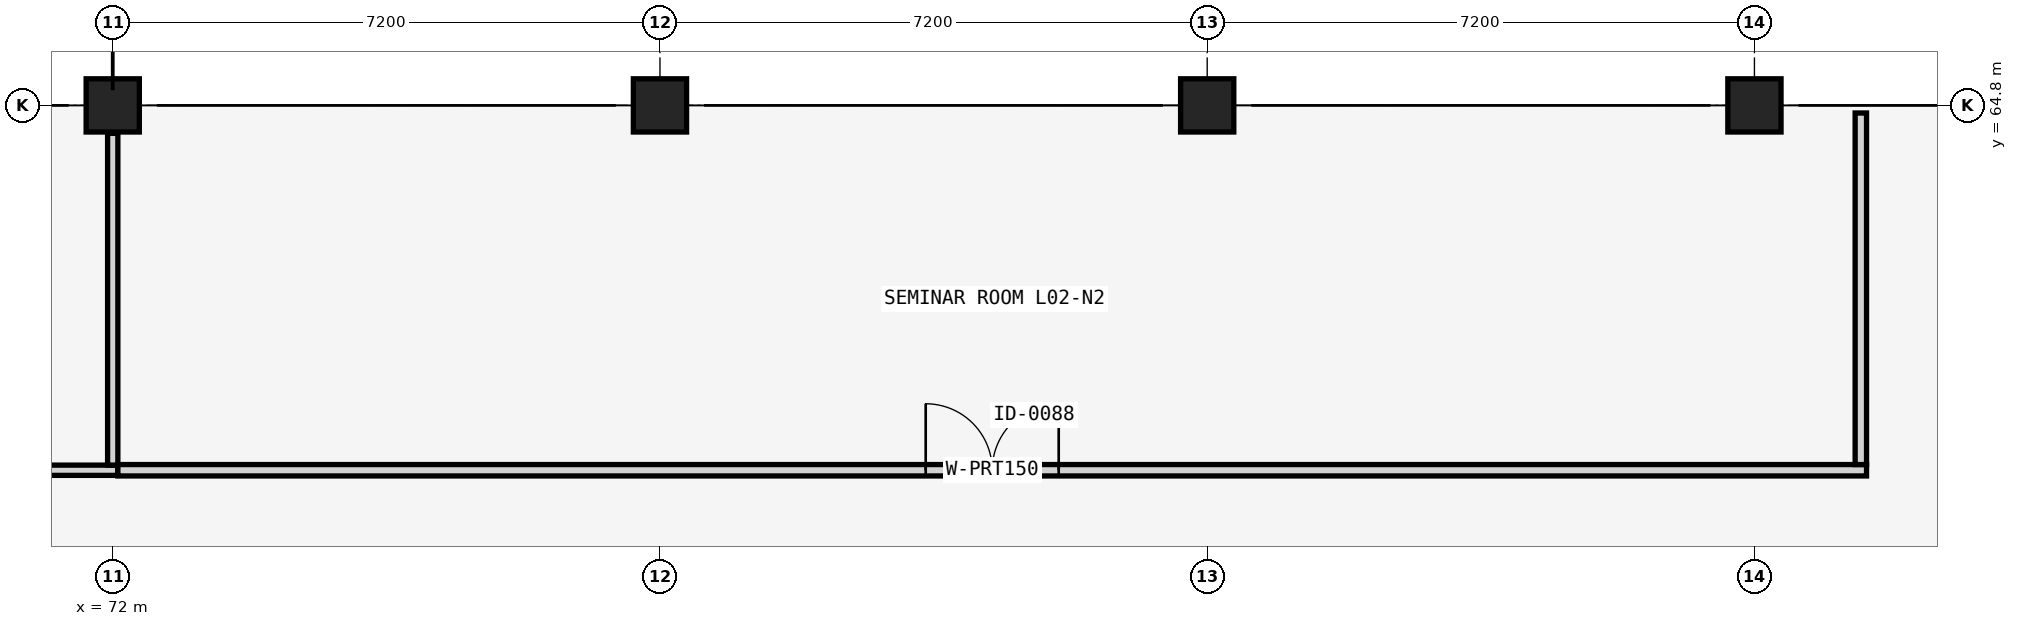
"""IFC4 building model, lengths in metres.
Left out: names, types, materials, properties, quantities, classifications, styles, units other than length and angle.
Written with IfcOpenShell. Run it as: python <this file> out.ifc"""

import sys

from ifc_helpers import new_model, si_unit, direction, frame, frame_2d, origin, origin_2d, place, context, subcontext, project, spatial, rectangle, extrude, element, fill, save


model = new_model("IFC4")
c1 = context("Model", 3, precision=1e-05, world=origin(), true_north=direction((0.0, 1.0)))
c2 = subcontext(c1, "Body", "Model", "MODEL_VIEW")
j1 = project(units=[si_unit("LENGTHUNIT", "METRE"), si_unit("PLANEANGLEUNIT", "RADIAN")], contexts=[c1])
p1 = place(None, origin())
s1 = spatial("IfcSite", under=j1, at=p1, CompositionType="ELEMENT")
p2 = place(p1, origin())
s2 = spatial("IfcBuilding", under=s1, at=p2, CompositionType="ELEMENT")
p3 = place(p2, frame((0.0, 0.0, 8.96)))
s3 = spatial("IfcBuildingStorey", under=s2, at=p3, CompositionType="ELEMENT", Elevation=8.96)
for number, where, z_axis, x_axis in (
    (1, (72.0, 64.8, 0.0), (0.0, 0.0, 1.0), (1.0, 0.0, 0.0)),
    (2, (79.2, 64.8, 0.0), (0.0, 0.0, 1.0), (1.0, 0.0, 0.0)),
    (3, (86.4, 64.8, 0.0), (0.0, 0.0, 1.0), (1.0, 0.0, 0.0)),
    (4, (93.6, 64.8, 0.0), (0.0, 0.0, 1.0), (1.0, 0.0, 0.0)),
):
    element("IfcColumn", number, at=place(p3, frame(where, z_axis=z_axis, x_axis=x_axis)), inside=s3, PredefinedType="COLUMN", context=c2, shape_type="SweptSolid", body=[
        extrude(rectangle(XDim=0.7, YDim=0.7, at=origin_2d()), origin(), (0.0, 0.0, 1.0), 4.16),
    ])
p4 = place(p3, frame((43.133, 60.0, 0.0), z_axis=(0.0, 0.0, 1.0), x_axis=(1.0, 0.0, 0.0)))
e5 = element("IfcWall", 5, at=p4, inside=s3, PredefinedType="PARTITIONING", context=c2, shape_type="SweptSolid", body=[
    extrude(rectangle(XDim=28.935, YDim=0.135, at=frame_2d((14.467, 0.0))), origin(), (0.0, 0.0, 1.0), 3.26),
])
p5 = place(p4, frame((13.742, 0.0, 0.0)))
e6 = element("IfcOpeningElement", 6, at=p5, cuts=e5, PredefinedType="OPENING", context=c2, shape_type="SweptSolid", body=[
    extrude(rectangle(XDim=1.45, YDim=2.2, at=frame_2d((0.725, 1.1))), frame((0.0, 0.078, 0.0), z_axis=(0.0, -1.0, 0.0), x_axis=(1.0, 0.0, 0.0)), (0.0, 0.0, 1.0), 0.155),
])
p6 = place(p3, frame((72.0, 60.067, 0.0), z_axis=(0.0, 0.0, 1.0), x_axis=(0.0, 1.0, 0.0)))
e7 = element("IfcWall", 7, at=p6, inside=s3, PredefinedType="PARTITIONING", context=c2, shape_type="SweptSolid", body=[
    extrude(rectangle(XDim=4.365, YDim=0.135, at=frame_2d((2.183, 0.0))), origin(), (0.0, 0.0, 1.0), 3.26),
])
p7 = place(p3, frame((72.067, 60.0, 0.0), z_axis=(0.0, 0.0, 1.0), x_axis=(1.0, 0.0, 0.0)))
e8 = element("IfcWall", 8, at=p7, inside=s3, PredefinedType="PARTITIONING", context=c2, shape_type="SweptSolid", body=[
    extrude(rectangle(XDim=23.008, YDim=0.15, at=frame_2d((11.504, 0.0))), origin(), (0.0, 0.0, 1.0), 3.26),
])
p8 = place(p7, frame((10.629, 0.0, 0.0)))
e9 = element("IfcOpeningElement", 9, at=p8, cuts=e8, PredefinedType="OPENING", context=c2, shape_type="SweptSolid", body=[
    extrude(rectangle(XDim=1.75, YDim=2.25, at=frame_2d((0.875, 1.125))), frame((0.0, 0.085, 0.0), z_axis=(0.0, -1.0, 0.0), x_axis=(1.0, 0.0, 0.0)), (0.0, 0.0, 1.0), 0.17),
])
p9 = place(p3, frame((95.0, 60.075, 0.0), z_axis=(0.0, 0.0, 1.0), x_axis=(0.0, 1.0, 0.0)))
e10 = element("IfcWall", 10, at=p9, inside=s3, PredefinedType="PARTITIONING", context=c2, shape_type="SweptSolid", body=[
    extrude(rectangle(XDim=4.625, YDim=0.15, at=frame_2d((2.312, 0.0))), origin(), (0.0, 0.0, 1.0), 3.21),
])
p10 = place(p8, origin())
e11 = element("IfcDoor", 11, at=p10, inside=s3, OperationType="DOUBLE_DOOR_SINGLE_SWING", PredefinedType="DOOR", context=c2, shape_type="SweptSolid", body=[
    extrude(rectangle(XDim=1.75, YDim=2.25, at=frame_2d((0.875, 1.125))), frame((0.0, 0.025, 0.0), z_axis=(0.0, -1.0, 0.0), x_axis=(1.0, 0.0, 0.0)), (0.0, 0.0, 1.0), 0.05),
])
fill(e9, e11)
save(model, sys.argv[1])
